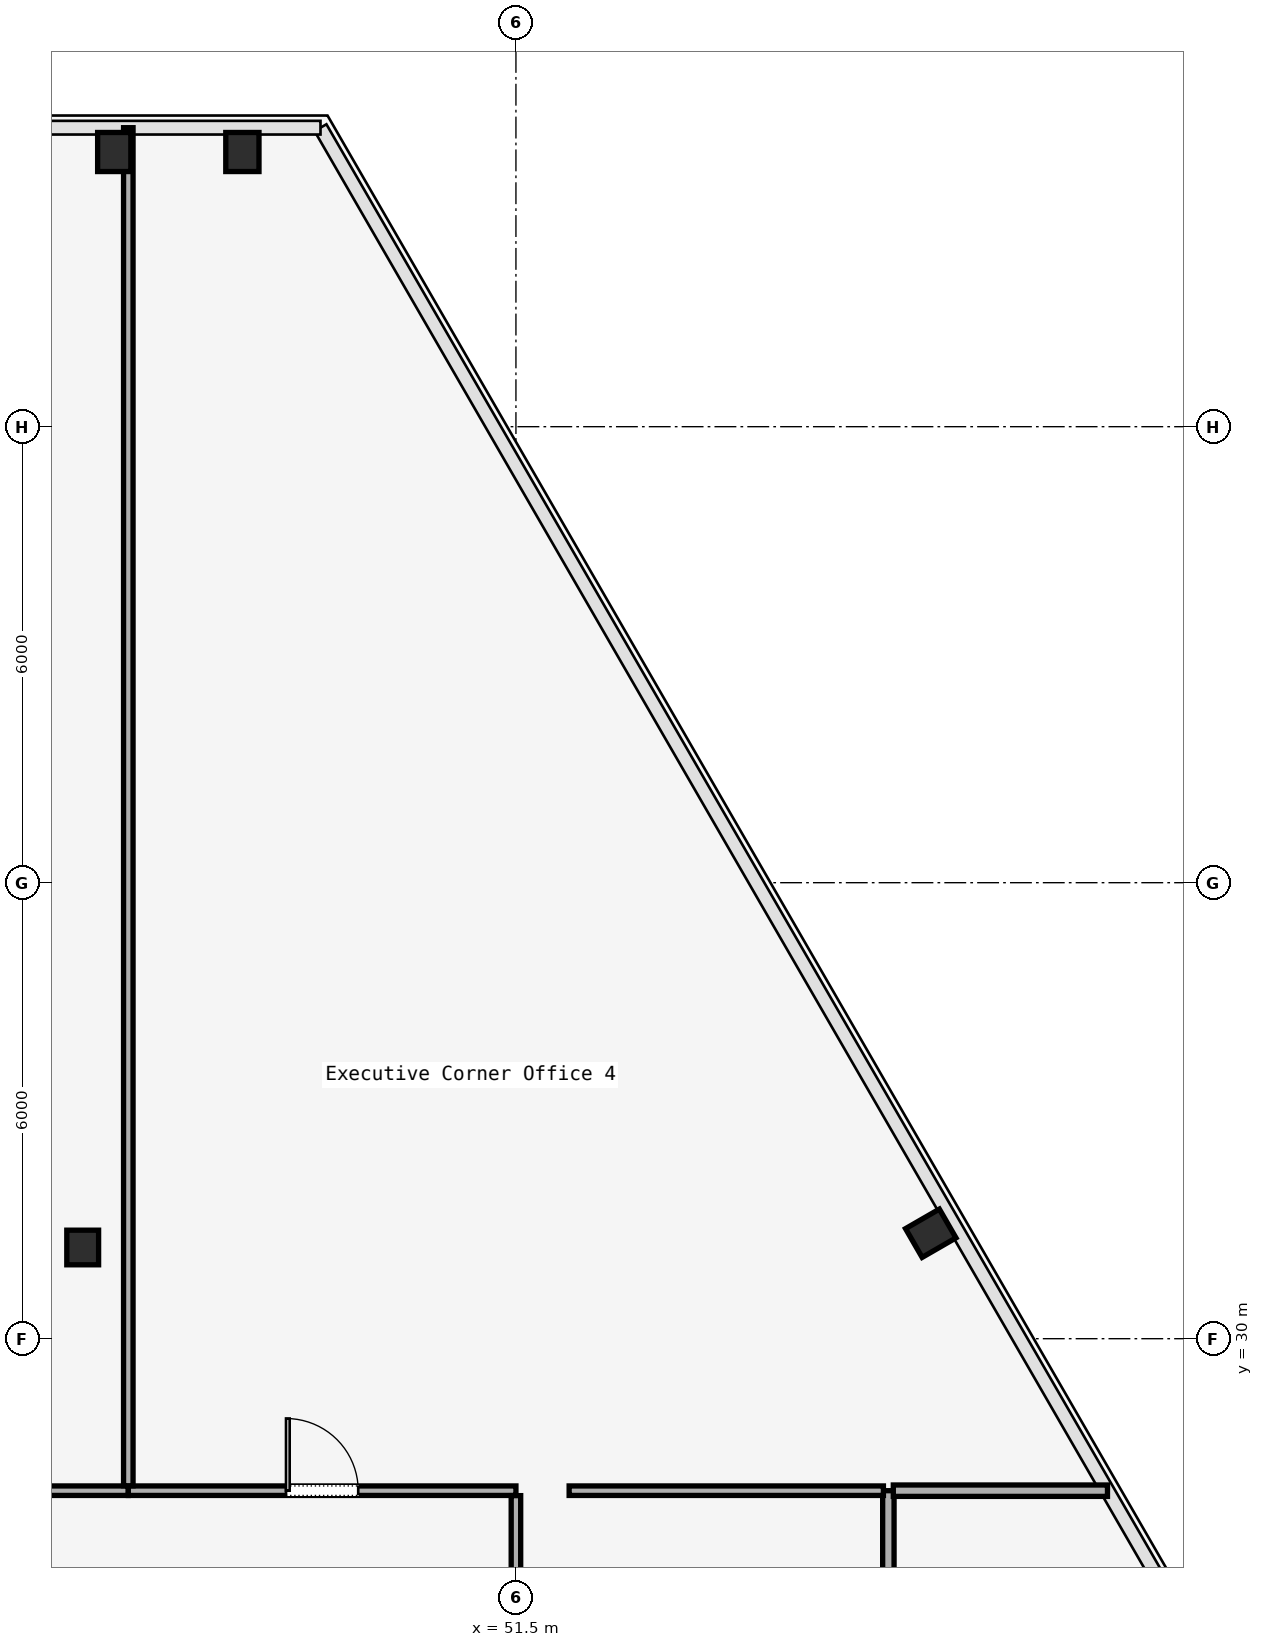
"""IFC4 building model, lengths in metres.
Left out: names, types, materials, properties, quantities, classifications, styles, units other than length and angle.
Written with IfcOpenShell. Run it as: python <this file> out.ifc"""

import sys

from ifc_helpers import new_model, si_unit, direction, frame, frame_2d, origin, origin_2d, place, context, subcontext, project, spatial, rectangle, i_section, extrude, element, fill, save


model = new_model("IFC4")
c1 = context("Model", 3, precision=1e-05, world=origin(), true_north=direction((0.0, 1.0)))
c2 = subcontext(c1, "Body", "Model", "MODEL_VIEW")
j1 = project(units=[si_unit("LENGTHUNIT", "METRE"), si_unit("PLANEANGLEUNIT", "RADIAN")], contexts=[c1])
p1 = place(None, origin())
s1 = spatial("IfcSite", under=j1, at=p1, CompositionType="ELEMENT")
p2 = place(p1, origin())
s2 = spatial("IfcBuilding", under=s1, at=p2, CompositionType="ELEMENT")
p3 = place(p2, frame((0.0, 0.0, 96.8)))
s3 = spatial("IfcBuildingStorey", under=s2, at=p3, CompositionType="ELEMENT", Elevation=96.8)
p4 = place(p3, frame((45.8, 31.2, 0.0), z_axis=(0.0, 0.0, 1.0), x_axis=(1.0, 0.0, 0.0)))
e1 = element("IfcColumn", 1, at=p4, inside=s3, PredefinedType="COLUMN", context=c2, shape_type="SweptSolid", body=[
    extrude(i_section(OverallWidth=0.418, OverallDepth=0.456, WebThickness=0.042, FlangeThickness=0.067, FilletRadius=0.015, at=origin_2d()), origin(), (0.0, 0.0, 1.0), 3.58),
])
p5 = place(p3, frame((56.958, 31.387, 0.0), z_axis=(-0.024182395063, -0.041757206124, 0.998835095251), x_axis=(0.000820020231, 0.999126112258, 0.041789225533)))
e2 = element("IfcColumn", 2, at=p5, inside=s3, PredefinedType="COLUMN", context=c2, shape_type="SweptSolid", body=[
    extrude(i_section(OverallWidth=0.437, OverallDepth=0.514, WebThickness=0.061, FlangeThickness=0.077, FilletRadius=0.015, at=origin_2d()), origin(), (0.0, 0.0, 1.0), 3.584),
])
p6 = place(p3, frame((47.901, 45.614, 0.0), z_axis=(-0.046188014354, 0.007970498052, 0.998900965307), x_axis=(-0.170052930364, -0.985434929802, 0.0)))
e3 = element("IfcColumn", 3, at=p6, inside=s3, PredefinedType="COLUMN", context=c2, shape_type="SweptSolid", body=[
    extrude(i_section(OverallWidth=0.437, OverallDepth=0.514, WebThickness=0.061, FlangeThickness=0.077, FilletRadius=0.015, at=origin_2d()), origin(), (0.0, 0.0, 1.0), 3.584),
])
p7 = place(p3, frame((46.215, 45.614, 0.0), z_axis=(-0.032989235729, 0.007974670621, 0.999423891527), x_axis=(-0.234967710036, -0.972003176559, 0.0)))
e4 = element("IfcColumn", 4, at=p7, inside=s3, PredefinedType="COLUMN", context=c2, shape_type="SweptSolid", body=[
    extrude(i_section(OverallWidth=0.437, OverallDepth=0.514, WebThickness=0.061, FlangeThickness=0.077, FilletRadius=0.015, at=origin_2d()), origin(), (0.0, 0.0, 1.0), 3.582),
])
p8 = place(p3, frame((40.8, 28.0, 0.0), z_axis=(0.0, 0.0, 1.0), x_axis=(1.0, 0.0, 0.0)))
e5 = element("IfcWall", 5, at=p8, inside=s3, PredefinedType="PARTITIONING", context=c2, shape_type="SweptSolid", body=[
    extrude(rectangle(XDim=5.6, YDim=0.125, at=frame_2d((2.8, 0.0))), origin(), (0.0, 0.0, 1.0), 2.95),
])
p9 = place(p8, frame((2.325, 0.0, 0.0)))
e6 = element("IfcOpeningElement", 6, at=p9, cuts=e5, PredefinedType="OPENING", context=c2, shape_type="SweptSolid", body=[
    extrude(rectangle(XDim=0.95, YDim=2.2, at=frame_2d((0.475, 1.1))), frame((0.0, 0.062, 0.0), z_axis=(0.0, -1.0, 0.0), x_axis=(1.0, 0.0, 0.0)), (0.0, 0.0, 1.0), 0.125),
])
p10 = place(p3, frame((46.4, 28.0, 0.0), z_axis=(0.0, 0.0, 1.0), x_axis=(1.0, 0.0, 0.0)))
e7 = element("IfcWall", 7, at=p10, inside=s3, PredefinedType="PARTITIONING", context=c2, shape_type="SweptSolid", body=[
    extrude(rectangle(XDim=5.1, YDim=0.125, at=frame_2d((2.55, 0.0))), origin(), (0.0, 0.0, 1.0), 2.95),
])
p11 = place(p10, frame((2.075, 0.0, 0.0)))
e8 = element("IfcOpeningElement", 8, at=p11, cuts=e7, PredefinedType="OPENING", context=c2, shape_type="SweptSolid", body=[
    extrude(rectangle(XDim=0.95, YDim=2.2, at=frame_2d((0.475, 1.1))), frame((0.0, 0.062, 0.0), z_axis=(0.0, -1.0, 0.0), x_axis=(1.0, 0.0, 0.0)), (0.0, 0.0, 1.0), 0.125),
])
p12 = place(p3, frame((51.5, 27.935, 0.0), z_axis=(0.0, 0.0, 1.0), x_axis=(0.0, -1.0, 0.0)))
e9 = element("IfcWall", 9, at=p12, inside=s3, PredefinedType="PARTITIONING", context=c2, shape_type="SweptSolid", body=[
    extrude(rectangle(XDim=1.735, YDim=0.125, at=frame_2d((0.868, 0.0))), origin(), (0.0, 0.0, 1.0), 2.95),
])
p13 = place(p3, frame((56.4, 17.065, 0.0), z_axis=(0.0, 0.0, 1.0), x_axis=(0.0, 1.0, 0.0)))
e10 = element("IfcWall", 10, at=p13, inside=s3, PredefinedType="PARTITIONING", context=c2, shape_type="SweptSolid", body=[
    extrude(rectangle(XDim=10.935, YDim=0.15, at=frame_2d((5.468, 0.0))), origin(), (0.0, 0.0, 1.0), 2.95),
])
p14 = place(p3, frame((56.465, 28.0, 0.0), z_axis=(0.0, 0.0, 1.0), x_axis=(1.0, 0.0, 0.0)))
e11 = element("IfcWall", 11, at=p14, inside=s3, PredefinedType="PARTITIONING", context=c2, shape_type="SweptSolid", body=[
    extrude(rectangle(XDim=2.818, YDim=0.15, at=frame_2d((1.409, 0.0))), origin(), (0.0, 0.0, 1.0), 2.95),
])
p15 = place(p3, frame((52.2, 28.0, 0.0), z_axis=(0.0, 0.0, 1.0), x_axis=(1.0, 0.0, 0.0)))
e12 = element("IfcWall", 12, at=p15, inside=s3, PredefinedType="PARTITIONING", context=c2, shape_type="SweptSolid", body=[
    extrude(rectangle(XDim=4.135, YDim=0.125, at=frame_2d((2.067, 0.0))), origin(), (0.0, 0.0, 1.0), 2.95),
])
p16 = place(p3, frame((46.4, 28.065, 0.0), z_axis=(0.0, 0.0, 1.0), x_axis=(0.0, 1.0, 0.0)))
e13 = element("IfcWall", 13, at=p16, inside=s3, PredefinedType="PARTITIONING", context=c2, shape_type="SweptSolid", body=[
    extrude(rectangle(XDim=17.869, YDim=0.125, at=frame_2d((8.935, 0.0))), origin(), (0.0, 0.0, 1.0), 2.95),
])
p17 = place(p11, origin())
e14 = element("IfcDoor", 14, at=p17, inside=s3, OperationType="SINGLE_SWING_LEFT", PredefinedType="DOOR", context=c2, shape_type="SweptSolid", body=[
    extrude(rectangle(XDim=0.95, YDim=2.2, at=frame_2d((0.475, 1.1))), frame((0.0, 0.025, 0.0), z_axis=(0.0, -1.0, 0.0), x_axis=(1.0, 0.0, 0.0)), (0.0, 0.0, 1.0), 0.05),
])
fill(e8, e14)
save(model, sys.argv[1])
